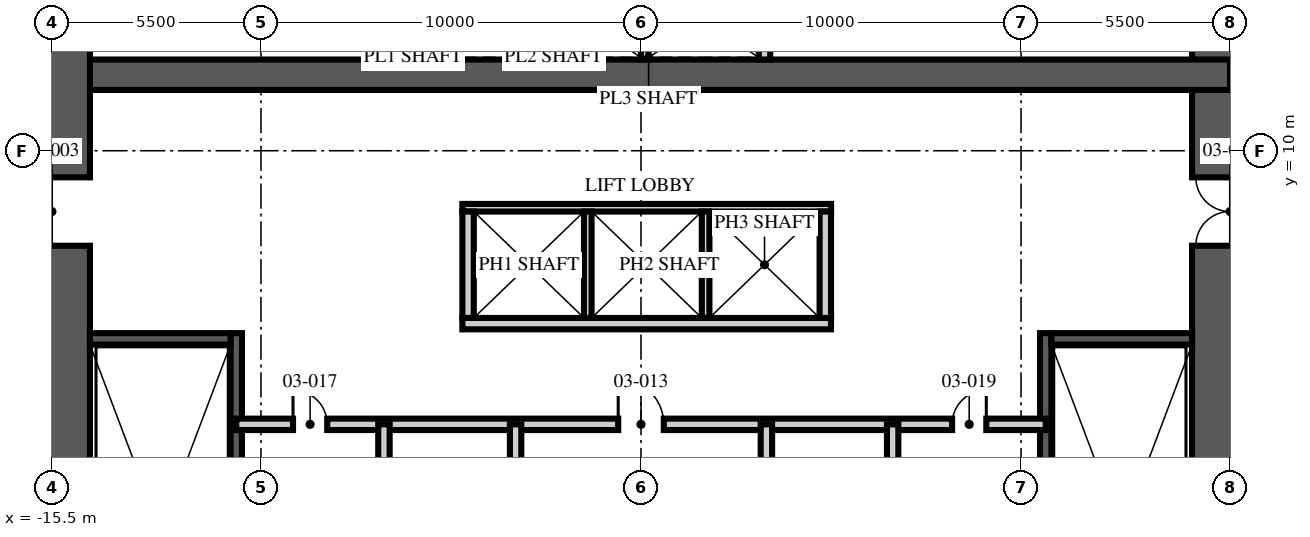
"""IFC4 building model, lengths in metres.
Left out: names, types, materials, properties, quantities, classifications, styles, units other than length and angle.
Written with IfcOpenShell. Run it as: python <this file> out.ifc"""

import sys

from ifc_helpers import new_model, si_unit, direction, frame, frame_2d, origin, place, context, subcontext, project, spatial, rectangle, extrude, element, fill, save


model = new_model("IFC4")
c1 = context("Model", 3, precision=1e-05, world=origin(), true_north=direction((0.0, 1.0)))
c2 = subcontext(c1, "Body", "Model", "MODEL_VIEW")
j1 = project(units=[si_unit("LENGTHUNIT", "METRE"), si_unit("PLANEANGLEUNIT", "RADIAN")], contexts=[c1])
p1 = place(None, origin())
s1 = spatial("IfcSite", under=j1, at=p1, CompositionType="ELEMENT")
p2 = place(p1, origin())
s2 = spatial("IfcBuilding", under=s1, at=p2, CompositionType="ELEMENT")
p3 = place(p2, frame((0.0, 0.0, 16.0)))
s3 = spatial("IfcBuildingStorey", under=s2, at=p3, CompositionType="ELEMENT", Elevation=16.0)
p4 = place(p3, frame((15.5, -15.5, -0.3), z_axis=(0.0, 0.0, 1.0), x_axis=(0.0, 1.0, 0.0)))
e1 = element("IfcWall", 1, at=p4, inside=s3, PredefinedType="SHEAR", context=c2, shape_type="SweptSolid", body=[
    extrude(rectangle(XDim=31.0, YDim=2.0, at=frame_2d((15.5, 0.0))), origin(), (0.0, 0.0, 1.0), 5.05),
])
p5 = place(p4, frame((6.5, 0.0, 0.3)))
e2 = element("IfcOpeningElement", 2, at=p5, cuts=e1, PredefinedType="OPENING", context=c2, shape_type="SweptSolid", body=[
    extrude(rectangle(XDim=1.2, YDim=2.1, at=frame_2d((0.6, 1.05))), frame((0.0, 1.01, 0.0), z_axis=(0.0, -1.0, 0.0), x_axis=(1.0, 0.0, 0.0)), (0.0, 0.0, 1.0), 2.02),
])
p6 = place(p4, frame((23.0, 0.0, 0.3)))
e3 = element("IfcOpeningElement", 3, at=p6, cuts=e1, PredefinedType="OPENING", context=c2, shape_type="SweptSolid", body=[
    extrude(rectangle(XDim=1.8, YDim=2.1, at=frame_2d((0.9, 1.05))), frame((0.0, 1.01, 0.0), z_axis=(0.0, -1.0, 0.0), x_axis=(1.0, 0.0, 0.0)), (0.0, 0.0, 1.0), 2.02),
])
p7 = place(p3, frame((-15.5, 12.0, -0.3), z_axis=(0.0, 0.0, 1.0), x_axis=(1.0, 0.0, 0.0)))
e4 = element("IfcWall", 4, at=p7, inside=s3, PredefinedType="SHEAR", context=c2, shape_type="SweptSolid", body=[
    extrude(rectangle(XDim=31.0, YDim=0.8, at=frame_2d((15.5, 0.0))), origin(), (0.0, 0.0, 1.0), 5.05),
])
p8 = place(p3, frame((-15.5, -15.5, -0.3), z_axis=(0.0, 0.0, 1.0), x_axis=(0.0, 1.0, 0.0)))
e5 = element("IfcWall", 5, at=p8, inside=s3, PredefinedType="SHEAR", context=c2, shape_type="SweptSolid", body=[
    extrude(rectangle(XDim=31.0, YDim=2.0, at=frame_2d((15.5, 0.0))), origin(), (0.0, 0.0, 1.0), 5.05),
])
p9 = place(p8, frame((6.5, 0.0, 0.3)))
e6 = element("IfcOpeningElement", 6, at=p9, cuts=e5, PredefinedType="OPENING", context=c2, shape_type="SweptSolid", body=[
    extrude(rectangle(XDim=1.2, YDim=2.1, at=frame_2d((0.6, 1.05))), frame((0.0, 1.01, 0.0), z_axis=(0.0, -1.0, 0.0), x_axis=(1.0, 0.0, 0.0)), (0.0, 0.0, 1.0), 2.02),
])
p10 = place(p8, frame((23.0, 0.0, 0.3)))
e7 = element("IfcOpeningElement", 7, at=p10, cuts=e5, PredefinedType="OPENING", context=c2, shape_type="SweptSolid", body=[
    extrude(rectangle(XDim=1.8, YDim=2.1, at=frame_2d((0.9, 1.05))), frame((0.0, 1.01, 0.0), z_axis=(0.0, -1.0, 0.0), x_axis=(1.0, 0.0, 0.0)), (0.0, 0.0, 1.0), 2.02),
])
p11 = place(p3, frame((-10.65, -4.9, 0.0), z_axis=(0.0, 0.0, 1.0), x_axis=(0.0, 1.0, 0.0)))
e8 = element("IfcWall", 8, at=p11, inside=s3, PredefinedType="SOLIDWALL", context=c2, shape_type="SweptSolid", body=[
    extrude(rectangle(XDim=10.1, YDim=0.3, at=frame_2d((5.05, 0.0))), origin(), (0.0, 0.0, 1.0), 4.75),
])
p12 = place(p3, frame((-14.5, 5.05, 0.0), z_axis=(0.0, 0.0, 1.0), x_axis=(1.0, 0.0, 0.0)))
e9 = element("IfcWall", 9, at=p12, inside=s3, PredefinedType="SOLIDWALL", context=c2, shape_type="SweptSolid", body=[
    extrude(rectangle(XDim=3.7, YDim=0.3, at=frame_2d((1.85, 0.0))), origin(), (0.0, 0.0, 1.0), 4.75),
])
p13 = place(p3, frame((10.65, -4.9, 0.0), z_axis=(0.0, 0.0, 1.0), x_axis=(0.0, 1.0, 0.0)))
e10 = element("IfcWall", 10, at=p13, inside=s3, PredefinedType="SOLIDWALL", context=c2, shape_type="SweptSolid", body=[
    extrude(rectangle(XDim=10.1, YDim=0.3, at=frame_2d((5.05, 0.0))), origin(), (0.0, 0.0, 1.0), 4.75),
])
p14 = place(p3, frame((14.5, 5.05, 0.0), z_axis=(0.0, 0.0, 1.0), x_axis=(-1.0, 0.0, 0.0)))
e11 = element("IfcWall", 11, at=p14, inside=s3, PredefinedType="SOLIDWALL", context=c2, shape_type="SweptSolid", body=[
    extrude(rectangle(XDim=3.7, YDim=0.3, at=frame_2d((1.85, 0.0))), origin(), (0.0, 0.0, 1.0), 4.75),
])
p15 = place(p3, frame((-4.7, 5.45, 0.0), z_axis=(0.0, 0.0, 1.0), x_axis=(1.0, 0.0, 0.0)))
e12 = element("IfcWall", 12, at=p15, inside=s3, PredefinedType="PARTITIONING", context=c2, shape_type="SweptSolid", body=[
    extrude(rectangle(XDim=9.7, YDim=0.3, at=frame_2d((4.85, 0.0))), origin(), (0.0, 0.0, 1.0), 4.75),
])
p16 = place(p3, frame((-4.7, 8.5, 0.0), z_axis=(0.0, 0.0, 1.0), x_axis=(1.0, 0.0, 0.0)))
e13 = element("IfcWall", 13, at=p16, inside=s3, PredefinedType="PARTITIONING", context=c2, shape_type="SweptSolid", body=[
    extrude(rectangle(XDim=9.7, YDim=0.2, at=frame_2d((4.85, 0.0))), origin(), (0.0, 0.0, 1.0), 4.75),
])
for number, where, z_axis, x_axis in (
    (14, (-4.55, 5.6, 0.0), (0.0, 0.0, 1.0), (0.0, 1.0, 0.0)),
    (15, (4.85, 5.6, 0.0), (0.0, 0.0, 1.0), (0.0, 1.0, 0.0)),
):
    element("IfcWall", number, at=place(p3, frame(where, z_axis=z_axis, x_axis=x_axis)), inside=s3, PredefinedType="PARTITIONING", context=c2, shape_type="SweptSolid", body=[
        extrude(rectangle(XDim=2.8, YDim=0.3, at=frame_2d((1.4, 0.0))), origin(), (0.0, 0.0, 1.0), 4.75),
    ])
for number, where, z_axis, x_axis in (
    (16, (-1.4, 5.6, 0.0), (0.0, 0.0, 1.0), (0.0, 1.0, 0.0)),
    (17, (1.7, 5.6, 0.0), (0.0, 0.0, 1.0), (0.0, 1.0, 0.0)),
):
    element("IfcWall", number, at=place(p3, frame(where, z_axis=z_axis, x_axis=x_axis)), inside=s3, PredefinedType="PARTITIONING", context=c2, shape_type="SweptSolid", body=[
        extrude(rectangle(XDim=2.8, YDim=0.2, at=frame_2d((1.4, 0.0))), origin(), (0.0, 0.0, 1.0), 4.75),
    ])
for number, where, z_axis, x_axis in (
    (18, (-6.15, 12.4, 0.0), (0.0, 0.0, 1.0), (0.0, 1.0, 0.0)),
    (19, (3.25, 12.4, 0.0), (0.0, 0.0, 1.0), (0.0, 1.0, 0.0)),
):
    element("IfcWall", number, at=place(p3, frame(where, z_axis=z_axis, x_axis=x_axis)), inside=s3, PredefinedType="PARTITIONING", context=c2, shape_type="SweptSolid", body=[
        extrude(rectangle(XDim=2.1, YDim=0.3, at=frame_2d((1.05, 0.0))), origin(), (0.0, 0.0, 1.0), 4.75),
    ])
for number, where, z_axis, x_axis in (
    (20, (-3.0, 12.4, 0.0), (0.0, 0.0, 1.0), (0.0, 1.0, 0.0)),
    (21, (0.1, 12.4, 0.0), (0.0, 0.0, 1.0), (0.0, 1.0, 0.0)),
):
    element("IfcWall", number, at=place(p3, frame(where, z_axis=z_axis, x_axis=x_axis)), inside=s3, PredefinedType="PARTITIONING", context=c2, shape_type="SweptSolid", body=[
        extrude(rectangle(XDim=2.1, YDim=0.2, at=frame_2d((1.05, 0.0))), origin(), (0.0, 0.0, 1.0), 4.75),
    ])
p17 = place(p3, frame((-10.65, 2.8, 0.0), z_axis=(0.0, 0.0, 1.0), x_axis=(1.0, 0.0, 0.0)))
e22 = element("IfcWall", 22, at=p17, inside=s3, PredefinedType="PARTITIONING", context=c2, shape_type="SweptSolid", body=[
    extrude(rectangle(XDim=21.3, YDim=0.3, at=frame_2d((10.65, 0.0))), origin(), (0.0, 0.0, 1.0), 4.75),
])
p18 = place(p17, frame((10.05, 0.0, 0.0)))
e23 = element("IfcOpeningElement", 23, at=p18, cuts=e22, PredefinedType="OPENING", context=c2, shape_type="SweptSolid", body=[
    extrude(rectangle(XDim=1.2, YDim=2.1, at=frame_2d((0.6, 1.05))), frame((0.0, 0.16, 0.0), z_axis=(0.0, -1.0, 0.0), x_axis=(1.0, 0.0, 0.0)), (0.0, 0.0, 1.0), 0.32),
])
p19 = place(p17, frame((1.493, 0.0, 0.0)))
e24 = element("IfcOpeningElement", 24, at=p19, cuts=e22, PredefinedType="OPENING", context=c2, shape_type="SweptSolid", body=[
    extrude(rectangle(XDim=0.9, YDim=2.1, at=frame_2d((0.45, 1.05))), frame((0.0, 0.16, 0.0), z_axis=(0.0, -1.0, 0.0), x_axis=(1.0, 0.0, 0.0)), (0.0, 0.0, 1.0), 0.32),
])
p20 = place(p17, frame((18.836, 0.0, 0.0)))
e25 = element("IfcOpeningElement", 25, at=p20, cuts=e22, PredefinedType="OPENING", context=c2, shape_type="SweptSolid", body=[
    extrude(rectangle(XDim=0.9, YDim=2.1, at=frame_2d((0.45, 1.05))), frame((0.0, 0.16, 0.0), z_axis=(0.0, -1.0, 0.0), x_axis=(1.0, 0.0, 0.0)), (0.0, 0.0, 1.0), 0.32),
])
p21 = place(p3, frame((-3.3, -6.65, 0.0), z_axis=(0.0, 0.0, 1.0), x_axis=(0.0, 1.0, 0.0)))
e26 = element("IfcWall", 26, at=p21, inside=s3, PredefinedType="PARTITIONING", context=c2, shape_type="SweptSolid", body=[
    extrude(rectangle(XDim=9.45, YDim=0.3, at=frame_2d((4.725, 0.0))), origin(), (0.0, 0.0, 1.0), 4.75),
])
p22 = place(p21, frame((4.275, 0.0, 0.0)))
e27 = element("IfcOpeningElement", 27, at=p22, cuts=e26, PredefinedType="OPENING", context=c2, shape_type="SweptSolid", body=[
    extrude(rectangle(XDim=0.9, YDim=2.1, at=frame_2d((0.45, 1.05))), frame((0.0, 0.16, 0.0), z_axis=(0.0, -1.0, 0.0), x_axis=(1.0, 0.0, 0.0)), (0.0, 0.0, 1.0), 0.32),
])
p23 = place(p3, frame((3.3, -6.65, 0.0), z_axis=(0.0, 0.0, 1.0), x_axis=(0.0, 1.0, 0.0)))
e28 = element("IfcWall", 28, at=p23, inside=s3, PredefinedType="PARTITIONING", context=c2, shape_type="SweptSolid", body=[
    extrude(rectangle(XDim=9.45, YDim=0.3, at=frame_2d((4.725, 0.0))), origin(), (0.0, 0.0, 1.0), 4.75),
])
p24 = place(p23, frame((4.275, 0.0, 0.0)))
e29 = element("IfcOpeningElement", 29, at=p24, cuts=e28, PredefinedType="OPENING", context=c2, shape_type="SweptSolid", body=[
    extrude(rectangle(XDim=0.9, YDim=2.1, at=frame_2d((0.45, 1.05))), frame((0.0, 0.16, 0.0), z_axis=(0.0, -1.0, 0.0), x_axis=(1.0, 0.0, 0.0)), (0.0, 0.0, 1.0), 0.32),
])
for number, where, z_axis, x_axis in (
    (30, (-6.764, -6.65, 0.0), (0.0, 0.0, 1.0), (0.0, 1.0, 0.0)),
    (31, (6.622, -6.65, 0.0), (0.0, 0.0, 1.0), (0.0, 1.0, 0.0)),
):
    element("IfcWall", number, at=place(p3, frame(where, z_axis=z_axis, x_axis=x_axis)), inside=s3, PredefinedType="PARTITIONING", context=c2, shape_type="SweptSolid", body=[
        extrude(rectangle(XDim=9.45, YDim=0.3, at=frame_2d((4.725, 0.0))), origin(), (0.0, 0.0, 1.0), 4.75),
    ])
p25 = place(p10, origin())
e32 = element("IfcDoor", 32, at=p25, inside=s3, OperationType="DOUBLE_DOOR_SINGLE_SWING", PredefinedType="DOOR", context=c2, shape_type="SweptSolid", body=[
    extrude(rectangle(XDim=1.8, YDim=2.1, at=frame_2d((0.9, 1.05))), frame((0.0, 0.025, 0.0), z_axis=(0.0, -1.0, 0.0), x_axis=(1.0, 0.0, 0.0)), (0.0, 0.0, 1.0), 0.05),
])
fill(e7, e32)
p26 = place(p6, origin())
e33 = element("IfcDoor", 33, at=p26, inside=s3, OperationType="DOUBLE_DOOR_SINGLE_SWING", PredefinedType="DOOR", context=c2, shape_type="SweptSolid", body=[
    extrude(rectangle(XDim=1.8, YDim=2.1, at=frame_2d((0.9, 1.05))), frame((0.0, 0.025, 0.0), z_axis=(0.0, -1.0, 0.0), x_axis=(1.0, 0.0, 0.0)), (0.0, 0.0, 1.0), 0.05),
])
fill(e3, e33)
p27 = place(p18, origin())
e34 = element("IfcDoor", 34, at=p27, inside=s3, OperationType="SINGLE_SWING_LEFT", PredefinedType="DOOR", context=c2, shape_type="SweptSolid", body=[
    extrude(rectangle(XDim=1.2, YDim=2.1, at=frame_2d((0.6, 1.05))), frame((0.0, 0.025, 0.0), z_axis=(0.0, -1.0, 0.0), x_axis=(1.0, 0.0, 0.0)), (0.0, 0.0, 1.0), 0.05),
])
fill(e23, e34)
p28 = place(p19, origin())
e35 = element("IfcDoor", 35, at=p28, inside=s3, OperationType="SINGLE_SWING_LEFT", PredefinedType="DOOR", context=c2, shape_type="SweptSolid", body=[
    extrude(rectangle(XDim=0.9, YDim=2.1, at=frame_2d((0.45, 1.05))), frame((0.0, 0.025, 0.0), z_axis=(0.0, -1.0, 0.0), x_axis=(1.0, 0.0, 0.0)), (0.0, 0.0, 1.0), 0.05),
])
fill(e24, e35)
p29 = place(p20, origin())
e36 = element("IfcDoor", 36, at=p29, inside=s3, OperationType="SINGLE_SWING_RIGHT", PredefinedType="DOOR", context=c2, shape_type="SweptSolid", body=[
    extrude(rectangle(XDim=0.9, YDim=2.1, at=frame_2d((0.45, 1.05))), frame((0.0, 0.025, 0.0), z_axis=(0.0, -1.0, 0.0), x_axis=(1.0, 0.0, 0.0)), (0.0, 0.0, 1.0), 0.05),
])
fill(e25, e36)
save(model, sys.argv[1])
